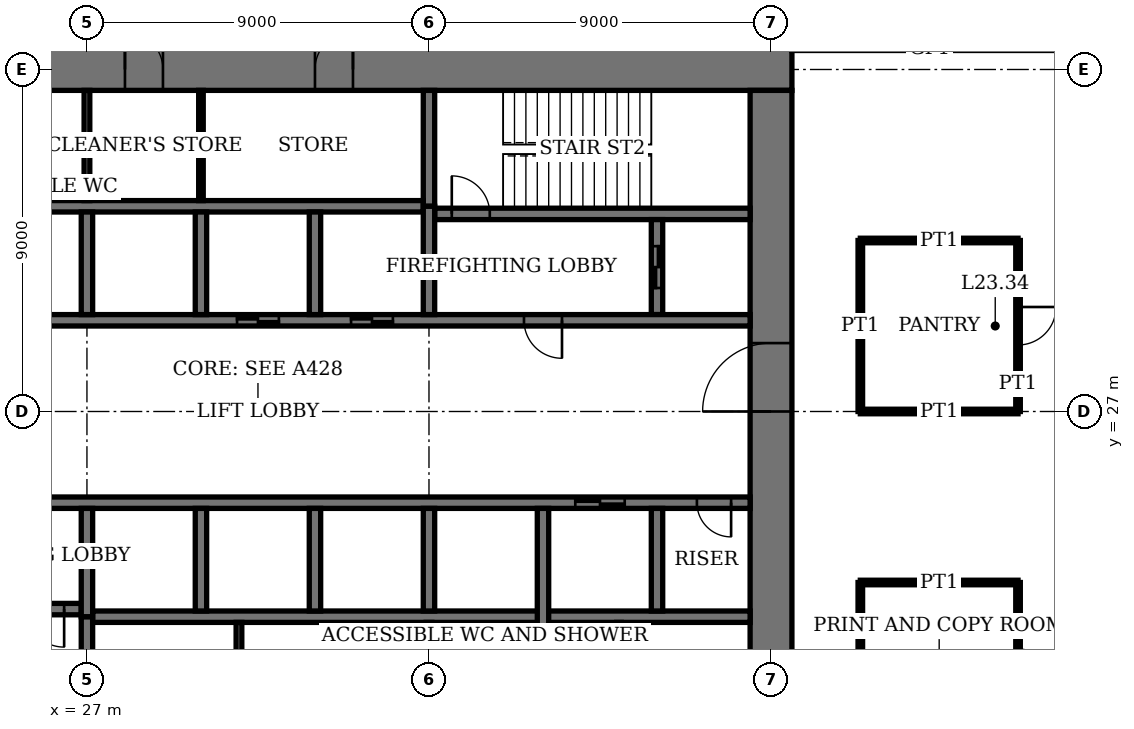
"""IFC4 building model, lengths in metres.
Left out: names, types, materials, properties, quantities, classifications, styles, units other than length and angle.
Written with IfcOpenShell. Run it as: python <this file> out.ifc"""

import sys

from ifc_helpers import new_model, si_unit, direction, frame, frame_2d, origin, place, context, subcontext, project, spatial, rectangle, extrude, element, fill, save


model = new_model("IFC4")
c1 = context("Model", 3, precision=1e-05, world=origin(), true_north=direction((0.0, 1.0)))
c2 = subcontext(c1, "Body", "Model", "MODEL_VIEW")
j1 = project(units=[si_unit("LENGTHUNIT", "METRE"), si_unit("PLANEANGLEUNIT", "RADIAN")], contexts=[c1])
p1 = place(None, origin())
s1 = spatial("IfcSite", under=j1, at=p1, CompositionType="ELEMENT")
p2 = place(p1, origin())
s2 = spatial("IfcBuilding", under=s1, at=p2, CompositionType="ELEMENT")
p3 = place(p2, frame((0.0, 0.0, 97.0)))
s3 = spatial("IfcBuildingStorey", under=s2, at=p3, CompositionType="ELEMENT", Elevation=97.0)
p4 = place(p3, frame((45.55, 36.0, 0.0), z_axis=(0.0, 0.0, 1.0), x_axis=(-1.0, 0.0, 0.0)))
e1 = element("IfcWall", 1, at=p4, inside=s3, PredefinedType="SHEAR", context=c2, shape_type="SweptSolid", body=[
    extrude(rectangle(XDim=28.1, YDim=1.1, at=frame_2d((14.05, 0.0))), origin(), (0.0, 0.0, 1.0), 4.0),
])
p5 = place(p4, frame((11.55, 0.0, 0.0)))
e2 = element("IfcOpeningElement", 2, at=p5, cuts=e1, PredefinedType="OPENING", context=c2, shape_type="SweptSolid", body=[
    extrude(rectangle(XDim=1.0, YDim=2.4, at=frame_2d((0.5, 1.2))), frame((0.0, 0.56, 0.0), z_axis=(0.0, -1.0, 0.0), x_axis=(1.0, 0.0, 0.0)), (0.0, 0.0, 1.0), 1.12),
])
p6 = place(p4, frame((16.55, 0.0, 0.0)))
e3 = element("IfcOpeningElement", 3, at=p6, cuts=e1, PredefinedType="OPENING", context=c2, shape_type="SweptSolid", body=[
    extrude(rectangle(XDim=1.0, YDim=2.4, at=frame_2d((0.5, 1.2))), frame((0.0, 0.56, 0.0), z_axis=(0.0, -1.0, 0.0), x_axis=(1.0, 0.0, 0.0)), (0.0, 0.0, 1.0), 1.12),
])
p7 = place(p4, frame((20.0, 0.0, 0.0)))
e4 = element("IfcOpeningElement", 4, at=p7, cuts=e1, PredefinedType="OPENING", context=c2, shape_type="SweptSolid", body=[
    extrude(rectangle(XDim=1.1, YDim=2.4, at=frame_2d((0.55, 1.2))), frame((0.0, 0.56, 0.0), z_axis=(0.0, -1.0, 0.0), x_axis=(1.0, 0.0, 0.0)), (0.0, 0.0, 1.0), 1.12),
])
p8 = place(p4, frame((24.05, 0.0, 0.0)))
e5 = element("IfcOpeningElement", 5, at=p8, cuts=e1, PredefinedType="OPENING", context=c2, shape_type="SweptSolid", body=[
    extrude(rectangle(XDim=1.0, YDim=2.4, at=frame_2d((0.5, 1.2))), frame((0.0, 0.56, 0.0), z_axis=(0.0, -1.0, 0.0), x_axis=(1.0, 0.0, 0.0)), (0.0, 0.0, 1.0), 1.12),
])
p9 = place(p3, frame((45.0, 18.55, 0.0), z_axis=(0.0, 0.0, 1.0), x_axis=(0.0, 1.0, 0.0)))
e6 = element("IfcWall", 6, at=p9, inside=s3, PredefinedType="SHEAR", context=c2, shape_type="SweptSolid", body=[
    extrude(rectangle(XDim=16.9, YDim=1.1, at=frame_2d((8.45, 0.0))), origin(), (0.0, 0.0, 1.0), 4.0),
])
p10 = place(p9, frame((8.45, 0.0, 0.0)))
e7 = element("IfcOpeningElement", 7, at=p10, cuts=e6, PredefinedType="OPENING", context=c2, shape_type="SweptSolid", body=[
    extrude(rectangle(XDim=1.8, YDim=2.4, at=frame_2d((0.9, 1.2))), frame((0.0, 0.56, 0.0), z_axis=(0.0, -1.0, 0.0), x_axis=(1.0, 0.0, 0.0)), (0.0, 0.0, 1.0), 1.12),
])
p11 = place(p3, frame((18.55, 21.8, 0.0), z_axis=(0.0, 0.0, 1.0), x_axis=(1.0, 0.0, 0.0)))
e8 = element("IfcWall", 8, at=p11, inside=s3, PredefinedType="SHEAR", context=c2, shape_type="SweptSolid", body=[
    extrude(rectangle(XDim=8.3, YDim=0.3, at=frame_2d((4.15, 0.0))), origin(), (0.0, 0.0, 1.0), 4.0),
])
p12 = place(p11, frame((6.85, 0.0, 0.0)))
e9 = element("IfcOpeningElement", 9, at=p12, cuts=e8, PredefinedType="OPENING", context=c2, shape_type="SweptSolid", body=[
    extrude(rectangle(XDim=1.0, YDim=2.4, at=frame_2d((0.5, 1.2))), frame((0.0, 0.16, 0.0), z_axis=(0.0, -1.0, 0.0), x_axis=(1.0, 0.0, 0.0)), (0.0, 0.0, 1.0), 0.32),
])
p13 = place(p3, frame((36.15, 32.2, 0.0), z_axis=(0.0, 0.0, 1.0), x_axis=(1.0, 0.0, 0.0)))
e10 = element("IfcWall", 10, at=p13, inside=s3, PredefinedType="SHEAR", context=c2, shape_type="SweptSolid", body=[
    extrude(rectangle(XDim=8.3, YDim=0.3, at=frame_2d((4.15, 0.0))), origin(), (0.0, 0.0, 1.0), 4.0),
])
p14 = place(p13, frame((0.45, 0.0, 0.0)))
e11 = element("IfcOpeningElement", 11, at=p14, cuts=e10, PredefinedType="OPENING", context=c2, shape_type="SweptSolid", body=[
    extrude(rectangle(XDim=1.0, YDim=2.4, at=frame_2d((0.5, 1.2))), frame((0.0, 0.16, 0.0), z_axis=(0.0, -1.0, 0.0), x_axis=(1.0, 0.0, 0.0)), (0.0, 0.0, 1.0), 0.32),
])
for number, where, z_axis, x_axis in (
    (12, (27.0, 18.55, 0.0), (0.0, 0.0, 1.0), (0.0, 1.0, 0.0)),
    (13, (36.0, 32.4, 0.0), (0.0, 0.0, 1.0), (0.0, 1.0, 0.0)),
):
    element("IfcWall", number, at=place(p3, frame(where, z_axis=z_axis, x_axis=x_axis)), inside=s3, PredefinedType="SHEAR", context=c2, shape_type="SweptSolid", body=[
        extrude(rectangle(XDim=3.05, YDim=0.3, at=frame_2d((1.525, 0.0))), origin(), (0.0, 0.0, 1.0), 4.0),
    ])
p15 = place(p3, frame((42.0, 29.55, 0.0), z_axis=(0.0, 0.0, 1.0), x_axis=(0.0, 1.0, 0.0)))
e14 = element("IfcWall", 14, at=p15, inside=s3, PredefinedType="SHEAR", context=c2, shape_type="SweptSolid", body=[
    extrude(rectangle(XDim=2.5, YDim=0.3, at=frame_2d((1.25, 0.0))), origin(), (0.0, 0.0, 1.0), 4.0),
])
p16 = place(p15, frame((0.7, 0.0, 0.0)))
e15 = element("IfcOpeningElement", 15, at=p16, cuts=e14, PredefinedType="OPENING", context=c2, shape_type="SweptSolid", body=[
    extrude(rectangle(XDim=1.1, YDim=2.4, at=frame_2d((0.55, 1.2))), frame((0.0, 0.16, 0.0), z_axis=(0.0, -1.0, 0.0), x_axis=(1.0, 0.0, 0.0)), (0.0, 0.0, 1.0), 0.32),
])
p17 = place(p3, frame((18.55, 24.6, 0.0), z_axis=(0.0, 0.0, 1.0), x_axis=(1.0, 0.0, 0.0)))
e16 = element("IfcWall", 16, at=p17, inside=s3, PredefinedType="SHEAR", context=c2, shape_type="SweptSolid", body=[
    extrude(rectangle(XDim=25.9, YDim=0.3, at=frame_2d((12.95, 0.0))), origin(), (0.0, 0.0, 1.0), 4.0),
])
p18 = place(p17, frame((4.95, 0.0, 0.0)))
e17 = element("IfcOpeningElement", 17, at=p18, cuts=e16, PredefinedType="OPENING", context=c2, shape_type="SweptSolid", body=[
    extrude(rectangle(XDim=1.0, YDim=2.4, at=frame_2d((0.5, 1.2))), frame((0.0, 0.16, 0.0), z_axis=(0.0, -1.0, 0.0), x_axis=(1.0, 0.0, 0.0)), (0.0, 0.0, 1.0), 0.32),
])
p19 = place(p17, frame((24.5, 0.0, 0.0)))
e18 = element("IfcOpeningElement", 18, at=p19, cuts=e16, PredefinedType="OPENING", context=c2, shape_type="SweptSolid", body=[
    extrude(rectangle(XDim=0.9, YDim=2.1, at=frame_2d((0.45, 1.05))), frame((0.0, 0.16, 0.0), z_axis=(0.0, -1.0, 0.0), x_axis=(1.0, 0.0, 0.0)), (0.0, 0.0, 1.0), 0.32),
])
p20 = place(p17, frame((21.3, 0.0, 0.0)))
e19 = element("IfcOpeningElement", 19, at=p20, cuts=e16, PredefinedType="OPENING", context=c2, shape_type="SweptSolid", body=[
    extrude(rectangle(XDim=1.3, YDim=2.4, at=frame_2d((0.65, 1.2))), frame((0.0, 0.16, 0.0), z_axis=(0.0, -1.0, 0.0), x_axis=(1.0, 0.0, 0.0)), (0.0, 0.0, 1.0), 0.32),
])
p21 = place(p3, frame((18.55, 29.4, 0.0), z_axis=(0.0, 0.0, 1.0), x_axis=(1.0, 0.0, 0.0)))
e20 = element("IfcWall", 20, at=p21, inside=s3, PredefinedType="SHEAR", context=c2, shape_type="SweptSolid", body=[
    extrude(rectangle(XDim=25.9, YDim=0.3, at=frame_2d((12.95, 0.0))), origin(), (0.0, 0.0, 1.0), 4.0),
])
p22 = place(p21, frame((19.95, 0.0, 0.0)))
e21 = element("IfcOpeningElement", 21, at=p22, cuts=e20, PredefinedType="OPENING", context=c2, shape_type="SweptSolid", body=[
    extrude(rectangle(XDim=1.0, YDim=2.4, at=frame_2d((0.5, 1.2))), frame((0.0, 0.16, 0.0), z_axis=(0.0, -1.0, 0.0), x_axis=(1.0, 0.0, 0.0)), (0.0, 0.0, 1.0), 0.32),
])
p23 = place(p21, frame((0.5, 0.0, 0.0)))
e22 = element("IfcOpeningElement", 22, at=p23, cuts=e20, PredefinedType="OPENING", context=c2, shape_type="SweptSolid", body=[
    extrude(rectangle(XDim=0.9, YDim=2.1, at=frame_2d((0.45, 1.05))), frame((0.0, 0.16, 0.0), z_axis=(0.0, -1.0, 0.0), x_axis=(1.0, 0.0, 0.0)), (0.0, 0.0, 1.0), 0.32),
])
p24 = place(p21, frame((15.4, 0.0, 0.0)))
e23 = element("IfcOpeningElement", 23, at=p24, cuts=e20, PredefinedType="OPENING", context=c2, shape_type="SweptSolid", body=[
    extrude(rectangle(XDim=1.1, YDim=2.4, at=frame_2d((0.55, 1.2))), frame((0.0, 0.16, 0.0), z_axis=(0.0, -1.0, 0.0), x_axis=(1.0, 0.0, 0.0)), (0.0, 0.0, 1.0), 0.32),
])
p25 = place(p21, frame((12.4, 0.0, 0.0)))
e24 = element("IfcOpeningElement", 24, at=p25, cuts=e20, PredefinedType="OPENING", context=c2, shape_type="SweptSolid", body=[
    extrude(rectangle(XDim=1.1, YDim=2.4, at=frame_2d((0.55, 1.2))), frame((0.0, 0.16, 0.0), z_axis=(0.0, -1.0, 0.0), x_axis=(1.0, 0.0, 0.0)), (0.0, 0.0, 1.0), 0.32),
])
p26 = place(p21, frame((3.3, 0.0, 0.0)))
e25 = element("IfcOpeningElement", 25, at=p26, cuts=e20, PredefinedType="OPENING", context=c2, shape_type="SweptSolid", body=[
    extrude(rectangle(XDim=1.3, YDim=2.4, at=frame_2d((0.65, 1.2))), frame((0.0, 0.16, 0.0), z_axis=(0.0, -1.0, 0.0), x_axis=(1.0, 0.0, 0.0)), (0.0, 0.0, 1.0), 0.32),
])
for number, where, z_axis, x_axis in (
    (26, (27.15, 21.6, 0.0), (0.0, 0.0, 1.0), (1.0, 0.0, 0.0)),
    (27, (18.55, 32.4, 0.0), (0.0, 0.0, 1.0), (1.0, 0.0, 0.0)),
):
    element("IfcWall", number, at=place(p3, frame(where, z_axis=z_axis, x_axis=x_axis)), inside=s3, PredefinedType="SHEAR", context=c2, shape_type="SweptSolid", body=[
        extrude(rectangle(XDim=17.3, YDim=0.3, at=frame_2d((8.65, 0.0))), origin(), (0.0, 0.0, 1.0), 4.0),
    ])
for number, where, z_axis, x_axis in (
    (28, (30.0, 21.75, 0.0), (0.0, 0.0, 1.0), (0.0, 1.0, 0.0)),
    (29, (33.0, 29.55, 0.0), (0.0, 0.0, 1.0), (0.0, 1.0, 0.0)),
    (30, (33.0, 21.75, 0.0), (0.0, 0.0, 1.0), (0.0, 1.0, 0.0)),
    (31, (30.0, 29.55, 0.0), (0.0, 0.0, 1.0), (0.0, 1.0, 0.0)),
    (32, (36.0, 21.75, 0.0), (0.0, 0.0, 1.0), (0.0, 1.0, 0.0)),
    (33, (27.0, 29.55, 0.0), (0.0, 0.0, 1.0), (0.0, 1.0, 0.0)),
):
    element("IfcWall", number, at=place(p3, frame(where, z_axis=z_axis, x_axis=x_axis)), inside=s3, PredefinedType="SHEAR", context=c2, shape_type="SweptSolid", body=[
        extrude(rectangle(XDim=2.7, YDim=0.3, at=frame_2d((1.35, 0.0))), origin(), (0.0, 0.0, 1.0), 4.0),
    ])
p27 = place(p3, frame((39.0, 18.55, 0.0), z_axis=(0.0, 0.0, 1.0), x_axis=(0.0, 1.0, 0.0)))
e34 = element("IfcWall", 34, at=p27, inside=s3, PredefinedType="SHEAR", context=c2, shape_type="SweptSolid", body=[
    extrude(rectangle(XDim=5.9, YDim=0.3, at=frame_2d((2.95, 0.0))), origin(), (0.0, 0.0, 1.0), 4.0),
])
p28 = place(p3, frame((42.0, 21.75, 0.0), z_axis=(0.0, 0.0, 1.0), x_axis=(0.0, 1.0, 0.0)))
e35 = element("IfcWall", 35, at=p28, inside=s3, PredefinedType="SHEAR", context=c2, shape_type="SweptSolid", body=[
    extrude(rectangle(XDim=2.7, YDim=0.3, at=frame_2d((1.35, 0.0))), origin(), (0.0, 0.0, 1.0), 4.0),
])
for number, where, z_axis, x_axis in (
    (36, (27.0, 21.6, 0.0), (0.0, 0.0, 1.0), (0.0, 1.0, 0.0)),
    (37, (36.0, 29.55, 0.0), (0.0, 0.0, 1.0), (0.0, 1.0, 0.0)),
):
    element("IfcWall", number, at=place(p3, frame(where, z_axis=z_axis, x_axis=x_axis)), inside=s3, PredefinedType="SHEAR", context=c2, shape_type="SweptSolid", body=[
        extrude(rectangle(XDim=2.85, YDim=0.3, at=frame_2d((1.425, 0.0))), origin(), (0.0, 0.0, 1.0), 4.0),
    ])
p29 = place(p3, frame((47.35, 22.5, 0.0), z_axis=(0.0, 0.0, 1.0), x_axis=(1.0, 0.0, 0.0)))
e38 = element("IfcWall", 38, at=p29, inside=s3, PredefinedType="PARTITIONING", context=c2, shape_type="SweptSolid", body=[
    extrude(rectangle(XDim=4.15, YDim=0.12, at=frame_2d((2.075, 0.0))), origin(), (0.0, 0.0, 1.0), 3.1),
])
p30 = place(p3, frame((47.35, 27.0, 0.0), z_axis=(0.0, 0.0, 1.0), x_axis=(1.0, 0.0, 0.0)))
e39 = element("IfcWall", 39, at=p30, inside=s3, PredefinedType="PARTITIONING", context=c2, shape_type="SweptSolid", body=[
    extrude(rectangle(XDim=4.15, YDim=0.12, at=frame_2d((2.075, 0.0))), origin(), (0.0, 0.0, 1.0), 3.05),
])
p31 = place(p3, frame((47.35, 31.5, 0.0), z_axis=(0.0, 0.0, 1.0), x_axis=(1.0, 0.0, 0.0)))
e40 = element("IfcWall", 40, at=p31, inside=s3, PredefinedType="PARTITIONING", context=c2, shape_type="SweptSolid", body=[
    extrude(rectangle(XDim=4.15, YDim=0.12, at=frame_2d((2.075, 0.0))), origin(), (0.0, 0.0, 1.0), 3.1),
])
for number, where, z_axis, x_axis in (
    (41, (47.35, 27.0, 0.0), (0.0, 0.0, 1.0), (0.0, 1.0, 0.0)),
    (42, (47.35, 18.0, 0.0), (0.0, 0.0, 1.0), (0.0, 1.0, 0.0)),
):
    element("IfcWall", number, at=place(p3, frame(where, z_axis=z_axis, x_axis=x_axis)), inside=s3, PredefinedType="PARTITIONING", context=c2, shape_type="SweptSolid", body=[
        extrude(rectangle(XDim=4.5, YDim=0.12, at=frame_2d((2.25, 0.0))), origin(), (0.0, 0.0, 1.0), 3.75),
    ])
p32 = place(p3, frame((51.5, 27.0, 0.0), z_axis=(0.0, 0.0, 1.0), x_axis=(0.0, 1.0, 0.0)))
e43 = element("IfcWall", 43, at=p32, inside=s3, PredefinedType="PARTITIONING", context=c2, shape_type="SweptSolid", body=[
    extrude(rectangle(XDim=4.5, YDim=0.12, at=frame_2d((2.25, 0.0))), origin(), (0.0, 0.0, 1.0), 3.75),
])
p33 = place(p32, frame((1.75, 0.0, 0.0)))
e44 = element("IfcOpeningElement", 44, at=p33, cuts=e43, PredefinedType="OPENING", context=c2, shape_type="SweptSolid", body=[
    extrude(rectangle(XDim=1.0, YDim=2.4, at=frame_2d((0.5, 1.2))), frame((0.0, 0.07, 0.0), z_axis=(0.0, -1.0, 0.0), x_axis=(1.0, 0.0, 0.0)), (0.0, 0.0, 1.0), 0.14),
])
p34 = place(p3, frame((51.5, 18.0, 0.0), z_axis=(0.0, 0.0, 1.0), x_axis=(0.0, 1.0, 0.0)))
e45 = element("IfcWall", 45, at=p34, inside=s3, PredefinedType="PARTITIONING", context=c2, shape_type="SweptSolid", body=[
    extrude(rectangle(XDim=4.5, YDim=0.12, at=frame_2d((2.25, 0.0))), origin(), (0.0, 0.0, 1.0), 3.75),
])
p35 = place(p34, frame((1.75, 0.0, 0.0)))
e46 = element("IfcOpeningElement", 46, at=p35, cuts=e45, PredefinedType="OPENING", context=c2, shape_type="SweptSolid", body=[
    extrude(rectangle(XDim=1.0, YDim=2.4, at=frame_2d((0.5, 1.2))), frame((0.0, 0.07, 0.0), z_axis=(0.0, -1.0, 0.0), x_axis=(1.0, 0.0, 0.0)), (0.0, 0.0, 1.0), 0.14),
])
for number, where, z_axis, x_axis in (
    (47, (31.0, 18.55, 0.0), (0.0, 0.0, 1.0), (0.0, 1.0, 0.0)),
    (48, (36.0, 18.55, 0.0), (0.0, 0.0, 1.0), (0.0, 1.0, 0.0)),
):
    element("IfcWall", number, at=place(p3, frame(where, z_axis=z_axis, x_axis=x_axis)), inside=s3, PredefinedType="PARTITIONING", context=c2, shape_type="SweptSolid", body=[
        extrude(rectangle(XDim=2.9, YDim=0.15, at=frame_2d((1.45, 0.0))), origin(), (0.0, 0.0, 1.0), 3.75),
    ])
p36 = place(p3, frame((30.0, 32.55, 0.0), z_axis=(0.0, 0.0, 1.0), x_axis=(0.0, 1.0, 0.0)))
e49 = element("IfcWall", 49, at=p36, inside=s3, PredefinedType="PARTITIONING", context=c2, shape_type="SweptSolid", body=[
    extrude(rectangle(XDim=2.9, YDim=0.12, at=frame_2d((1.45, 0.0))), origin(), (0.0, 0.0, 1.0), 3.75),
])
p37 = place(p3, frame((27.0, 32.55, 0.0), z_axis=(0.0, 0.0, 1.0), x_axis=(0.0, 1.0, 0.0)))
e50 = element("IfcWall", 50, at=p37, inside=s3, PredefinedType="PARTITIONING", context=c2, shape_type="SweptSolid", body=[
    extrude(rectangle(XDim=2.9, YDim=0.15, at=frame_2d((1.45, 0.0))), origin(), (0.0, 0.0, 1.0), 3.75),
])
p38 = place(p3, frame((41.0, 18.55, 0.0), z_axis=(0.0, 0.0, 1.0), x_axis=(0.0, 1.0, 0.0)))
e51 = element("IfcWall", 51, at=p38, inside=s3, PredefinedType="PARTITIONING", context=c2, shape_type="SweptSolid", body=[
    extrude(rectangle(XDim=2.9, YDim=0.12, at=frame_2d((1.45, 0.0))), origin(), (0.0, 0.0, 1.0), 3.75),
])
p39 = place(p38, frame((0.95, 0.0, 0.0)))
e52 = element("IfcOpeningElement", 52, at=p39, cuts=e51, PredefinedType="OPENING", context=c2, shape_type="SweptSolid", body=[
    extrude(rectangle(XDim=1.0, YDim=2.4, at=frame_2d((0.5, 1.2))), frame((0.0, 0.07, 0.0), z_axis=(0.0, -1.0, 0.0), x_axis=(1.0, 0.0, 0.0)), (0.0, 0.0, 1.0), 0.14),
])
p40 = place(p10, origin())
e53 = element("IfcDoor", 53, at=p40, inside=s3, OperationType="DOUBLE_DOOR_DOUBLE_SWING", PredefinedType="DOOR", context=c2, shape_type="SweptSolid", body=[
    extrude(rectangle(XDim=1.8, YDim=2.4, at=frame_2d((0.9, 1.2))), frame((0.0, 0.03, 0.0), z_axis=(0.0, -1.0, 0.0), x_axis=(1.0, 0.0, 0.0)), (0.0, 0.0, 1.0), 0.06),
    extrude(rectangle(XDim=0.04, YDim=2.4, at=frame_2d((0.02, 1.2))), frame((0.0, 0.55, 0.0), z_axis=(0.0, -1.0, 0.0), x_axis=(1.0, 0.0, 0.0)), (0.0, 0.0, 1.0), 1.1),
    extrude(rectangle(XDim=0.04, YDim=2.4, at=frame_2d((1.78, 1.2))), frame((0.0, 0.55, 0.0), z_axis=(0.0, -1.0, 0.0), x_axis=(1.0, 0.0, 0.0)), (0.0, 0.0, 1.0), 1.1),
    extrude(rectangle(XDim=1.8, YDim=0.04, at=frame_2d((0.9, 2.38))), frame((0.0, 0.55, 0.0), z_axis=(0.0, -1.0, 0.0), x_axis=(1.0, 0.0, 0.0)), (0.0, 0.0, 1.0), 1.1),
])
fill(e7, e53)
p41 = place(p5, origin())
e54 = element("IfcDoor", 54, at=p41, inside=s3, OperationType="SINGLE_SWING_LEFT", PredefinedType="DOOR", context=c2, shape_type="SweptSolid", body=[
    extrude(rectangle(XDim=1.0, YDim=2.4, at=frame_2d((0.5, 1.2))), frame((0.0, 0.025, 0.0), z_axis=(0.0, -1.0, 0.0), x_axis=(1.0, 0.0, 0.0)), (0.0, 0.0, 1.0), 0.05),
    extrude(rectangle(XDim=0.04, YDim=2.4, at=frame_2d((0.02, 1.2))), frame((0.0, 0.4, 0.0), z_axis=(0.0, -1.0, 0.0), x_axis=(1.0, 0.0, 0.0)), (0.0, 0.0, 1.0), 0.8),
    extrude(rectangle(XDim=0.04, YDim=2.4, at=frame_2d((0.98, 1.2))), frame((0.0, 0.4, 0.0), z_axis=(0.0, -1.0, 0.0), x_axis=(1.0, 0.0, 0.0)), (0.0, 0.0, 1.0), 0.8),
    extrude(rectangle(XDim=1.0, YDim=0.04, at=frame_2d((0.5, 2.38))), frame((0.0, 0.4, 0.0), z_axis=(0.0, -1.0, 0.0), x_axis=(1.0, 0.0, 0.0)), (0.0, 0.0, 1.0), 0.8),
])
fill(e2, e54)
p42 = place(p6, origin())
e55 = element("IfcDoor", 55, at=p42, inside=s3, OperationType="SINGLE_SWING_RIGHT", PredefinedType="DOOR", context=c2, shape_type="SweptSolid", body=[
    extrude(rectangle(XDim=1.0, YDim=2.4, at=frame_2d((0.5, 1.2))), frame((0.0, 0.025, 0.0), z_axis=(0.0, -1.0, 0.0), x_axis=(1.0, 0.0, 0.0)), (0.0, 0.0, 1.0), 0.05),
    extrude(rectangle(XDim=0.04, YDim=2.4, at=frame_2d((0.02, 1.2))), frame((0.0, 0.4, 0.0), z_axis=(0.0, -1.0, 0.0), x_axis=(1.0, 0.0, 0.0)), (0.0, 0.0, 1.0), 0.8),
    extrude(rectangle(XDim=0.04, YDim=2.4, at=frame_2d((0.98, 1.2))), frame((0.0, 0.4, 0.0), z_axis=(0.0, -1.0, 0.0), x_axis=(1.0, 0.0, 0.0)), (0.0, 0.0, 1.0), 0.8),
    extrude(rectangle(XDim=1.0, YDim=0.04, at=frame_2d((0.5, 2.38))), frame((0.0, 0.4, 0.0), z_axis=(0.0, -1.0, 0.0), x_axis=(1.0, 0.0, 0.0)), (0.0, 0.0, 1.0), 0.8),
])
fill(e3, e55)
p43 = place(p12, origin())
e56 = element("IfcDoor", 56, at=p43, inside=s3, OperationType="SINGLE_SWING_RIGHT", PredefinedType="DOOR", context=c2, shape_type="SweptSolid", body=[
    extrude(rectangle(XDim=1.0, YDim=2.4, at=frame_2d((0.5, 1.2))), frame((0.0, 0.03, 0.0), z_axis=(0.0, -1.0, 0.0), x_axis=(1.0, 0.0, 0.0)), (0.0, 0.0, 1.0), 0.06),
])
fill(e9, e56)
p44 = place(p14, origin())
e57 = element("IfcDoor", 57, at=p44, inside=s3, OperationType="SINGLE_SWING_RIGHT", PredefinedType="DOOR", context=c2, shape_type="SweptSolid", body=[
    extrude(rectangle(XDim=1.0, YDim=2.4, at=frame_2d((0.5, 1.2))), frame((0.0, 0.03, 0.0), z_axis=(0.0, -1.0, 0.0), x_axis=(1.0, 0.0, 0.0)), (0.0, 0.0, 1.0), 0.06),
])
fill(e11, e57)
p45 = place(p22, origin())
e58 = element("IfcDoor", 58, at=p45, inside=s3, OperationType="SINGLE_SWING_RIGHT", PredefinedType="DOOR", context=c2, shape_type="SweptSolid", body=[
    extrude(rectangle(XDim=1.0, YDim=2.4, at=frame_2d((0.5, 1.2))), frame((0.0, 0.03, 0.0), z_axis=(0.0, -1.0, 0.0), x_axis=(1.0, 0.0, 0.0)), (0.0, 0.0, 1.0), 0.06),
])
fill(e21, e58)
p46 = place(p19, origin())
e59 = element("IfcDoor", 59, at=p46, inside=s3, OperationType="SINGLE_SWING_RIGHT", PredefinedType="DOOR", context=c2, shape_type="SweptSolid", body=[
    extrude(rectangle(XDim=0.9, YDim=2.1, at=frame_2d((0.45, 1.05))), frame((0.0, 0.03, 0.0), z_axis=(0.0, -1.0, 0.0), x_axis=(1.0, 0.0, 0.0)), (0.0, 0.0, 1.0), 0.06),
])
fill(e18, e59)
p47 = place(p33, origin())
e60 = element("IfcDoor", 60, at=p47, inside=s3, OperationType="SINGLE_SWING_RIGHT", PredefinedType="DOOR", context=c2, shape_type="SweptSolid", body=[
    extrude(rectangle(XDim=1.0, YDim=2.4, at=frame_2d((0.5, 1.2))), frame((0.0, 0.025, 0.0), z_axis=(0.0, -1.0, 0.0), x_axis=(1.0, 0.0, 0.0)), (0.0, 0.0, 1.0), 0.05),
])
fill(e44, e60)
p48 = place(p24, origin())
e61 = element("IfcDoor", 61, at=p48, inside=s3, OperationType="DOUBLE_DOOR_SLIDING", PredefinedType="DOOR", context=c2, shape_type="SweptSolid", body=[
    extrude(rectangle(XDim=1.1, YDim=2.4, at=frame_2d((0.55, 1.2))), frame((0.0, 0.02, 0.0), z_axis=(0.0, -1.0, 0.0), x_axis=(1.0, 0.0, 0.0)), (0.0, 0.0, 1.0), 0.04),
])
fill(e23, e61)
p49 = place(p25, origin())
e62 = element("IfcDoor", 62, at=p49, inside=s3, OperationType="DOUBLE_DOOR_SLIDING", PredefinedType="DOOR", context=c2, shape_type="SweptSolid", body=[
    extrude(rectangle(XDim=1.1, YDim=2.4, at=frame_2d((0.55, 1.2))), frame((0.0, 0.02, 0.0), z_axis=(0.0, -1.0, 0.0), x_axis=(1.0, 0.0, 0.0)), (0.0, 0.0, 1.0), 0.04),
])
fill(e24, e62)
p50 = place(p20, origin())
e63 = element("IfcDoor", 63, at=p50, inside=s3, OperationType="DOUBLE_DOOR_SLIDING", PredefinedType="DOOR", context=c2, shape_type="SweptSolid", body=[
    extrude(rectangle(XDim=1.3, YDim=2.4, at=frame_2d((0.65, 1.2))), frame((0.0, 0.02, 0.0), z_axis=(0.0, -1.0, 0.0), x_axis=(1.0, 0.0, 0.0)), (0.0, 0.0, 1.0), 0.04),
])
fill(e19, e63)
p51 = place(p16, origin())
e64 = element("IfcDoor", 64, at=p51, inside=s3, OperationType="DOUBLE_DOOR_SLIDING", PredefinedType="DOOR", context=c2, shape_type="SweptSolid", body=[
    extrude(rectangle(XDim=1.1, YDim=2.4, at=frame_2d((0.55, 1.2))), frame((0.0, 0.03, 0.0), z_axis=(0.0, -1.0, 0.0), x_axis=(1.0, 0.0, 0.0)), (0.0, 0.0, 1.0), 0.06),
])
fill(e15, e64)
save(model, sys.argv[1])
